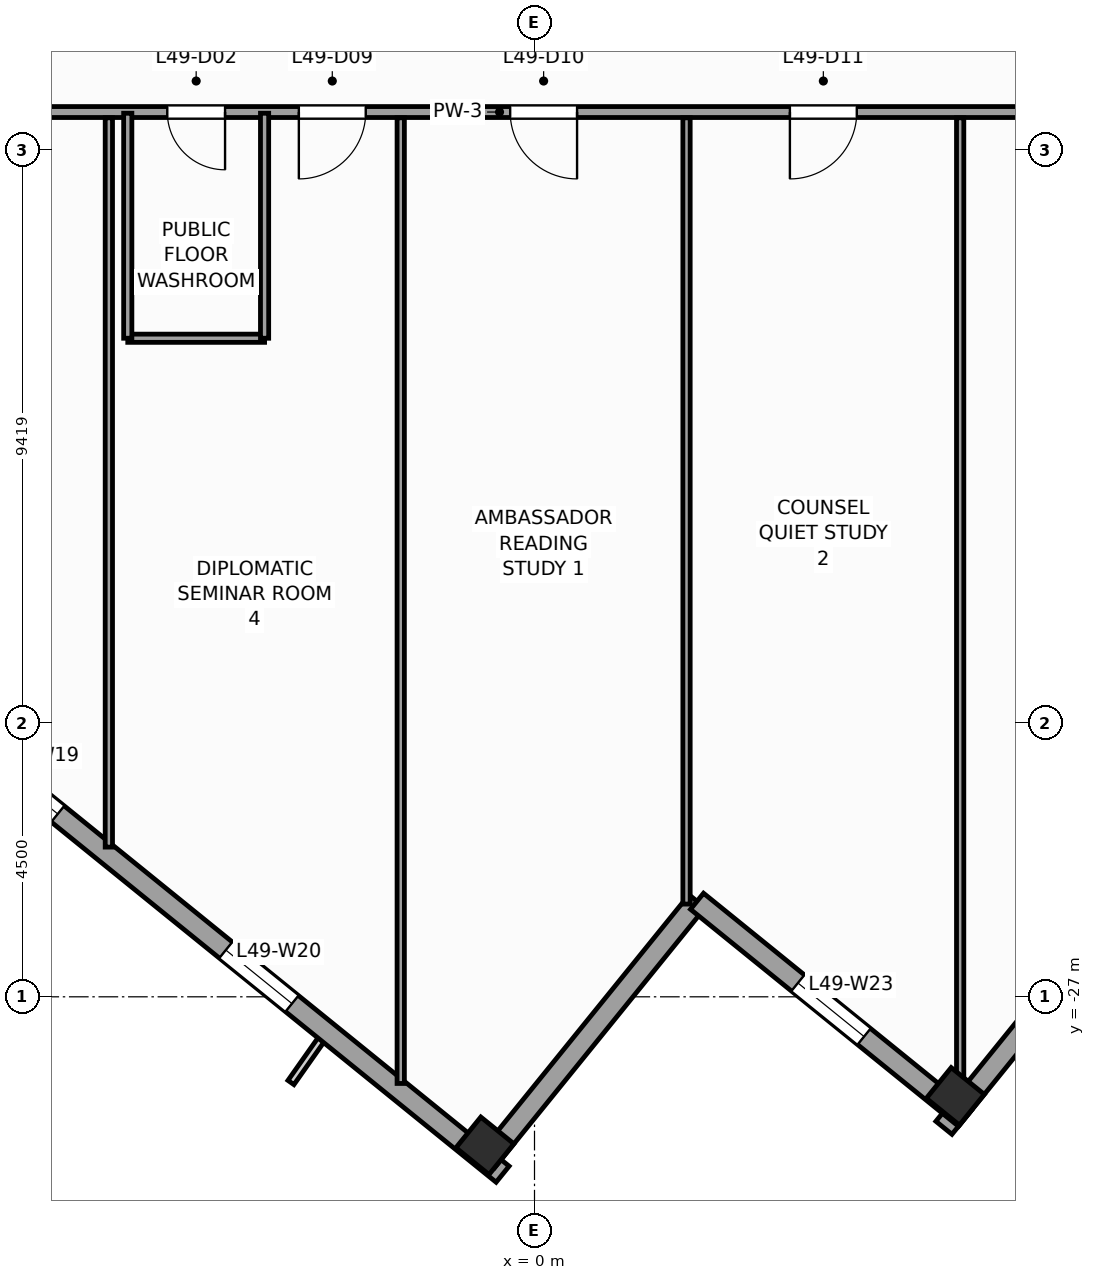
"""IFC4 building model, lengths in metres.
Left out: names, types, materials, properties, quantities, classifications, styles, units other than length and angle.
Written with IfcOpenShell. Run it as: python <this file> out.ifc"""

import sys

from ifc_helpers import new_model, si_unit, direction, frame, frame_2d, origin, origin_2d, place, context, subcontext, project, spatial, rectangle, extrude, source, transform, mapped, element, fill, save


model = new_model("IFC4")
c1 = context("Model", 3, precision=1e-05, world=origin(), true_north=direction((0.0, 1.0)))
c2 = subcontext(c1, "Body", "Model", "MODEL_VIEW")
j1 = project(units=[si_unit("LENGTHUNIT", "METRE"), si_unit("PLANEANGLEUNIT", "RADIAN")], contexts=[c1])
p1 = place(None, origin())
s1 = spatial("IfcSite", under=j1, at=p1, CompositionType="ELEMENT")
p2 = place(p1, origin())
s2 = spatial("IfcBuilding", under=s1, at=p2, CompositionType="ELEMENT")
p3 = place(p2, frame((0.0, 0.0, 205.6)))
s3 = spatial("IfcBuildingStorey", under=s2, at=p3, CompositionType="ELEMENT", Elevation=205.6)
m1 = source(origin(), c2, "Body", "SweptSolid", [
    extrude(rectangle(XDim=0.65, YDim=0.7, at=origin_2d()), origin(), (0.0, 0.0, 1.0), 3.9),
])
for number, where, z_axis, x_axis in (
    (1, (6.92, -28.637, 0.0), (0.0, 0.0, 1.0), (0.629, 0.777, 0.0)),
    (2, (-0.815, -29.45, 0.0), (0.0, 0.0, 1.0), (0.629, 0.777, 0.0)),
):
    element("IfcColumn", number, at=place(p3, frame(where, z_axis=z_axis, x_axis=x_axis)), inside=s3, PredefinedType="COLUMN", context=c2, shape_type="MappedRepresentation", body=[
        mapped(m1, transform((0.0, 0.0, 0.0), scale=1.0)),
    ])
p4 = place(p3, frame((6.733, -29.154, 0.0), z_axis=(0.0, 0.0, 1.0), x_axis=(0.629325378072, 0.77714192302, 0.0)))
e3 = element("IfcWall", 3, at=p4, inside=s3, PredefinedType="STANDARD", context=c2, shape_type="SweptSolid", body=[
    extrude(rectangle(XDim=36.84, YDim=0.34, at=frame_2d((18.42, 0.0))), origin(), (0.0, 0.0, 1.0), 2.96),
])
p5 = place(p4, frame((3.721, 0.0, 0.48)))
e4 = element("IfcOpeningElement", 4, at=p5, cuts=e3, PredefinedType="OPENING", context=c2, shape_type="SweptSolid", body=[
    extrude(rectangle(XDim=1.4, YDim=2.4, at=frame_2d((0.7, 1.2))), frame((0.0, 0.18, 0.0), z_axis=(0.0, -1.0, 0.0), x_axis=(1.0, 0.0, 0.0)), (0.0, 0.0, 1.0), 0.36),
])
p6 = place(p4, frame((10.559, 0.0, 0.58)))
e5 = element("IfcOpeningElement", 5, at=p6, cuts=e3, PredefinedType="OPENING", context=c2, shape_type="SweptSolid", body=[
    extrude(rectangle(XDim=1.75, YDim=2.3, at=frame_2d((0.875, 1.15))), frame((0.0, 0.18, 0.0), z_axis=(0.0, -1.0, 0.0), x_axis=(1.0, 0.0, 0.0)), (0.0, 0.0, 1.0), 0.36),
])
p7 = place(p4, frame((16.058, 0.0, 0.58)))
e6 = element("IfcOpeningElement", 6, at=p7, cuts=e3, PredefinedType="OPENING", context=c2, shape_type="SweptSolid", body=[
    extrude(rectangle(XDim=1.75, YDim=2.3, at=frame_2d((0.875, 1.15))), frame((0.0, 0.18, 0.0), z_axis=(0.0, -1.0, 0.0), x_axis=(1.0, 0.0, 0.0)), (0.0, 0.0, 1.0), 0.36),
])
p8 = place(p4, frame((24.176, 0.0, 0.58)))
e7 = element("IfcOpeningElement", 7, at=p8, cuts=e3, PredefinedType="OPENING", context=c2, shape_type="SweptSolid", body=[
    extrude(rectangle(XDim=1.75, YDim=2.3, at=frame_2d((0.875, 1.15))), frame((0.0, 0.18, 0.0), z_axis=(0.0, -1.0, 0.0), x_axis=(1.0, 0.0, 0.0)), (0.0, 0.0, 1.0), 0.36),
])
p9 = place(p4, frame((30.982, 0.0, 0.48)))
e8 = element("IfcOpeningElement", 8, at=p9, cuts=e3, PredefinedType="OPENING", context=c2, shape_type="SweptSolid", body=[
    extrude(rectangle(XDim=1.4, YDim=2.4, at=frame_2d((0.7, 1.2))), frame((0.0, 0.18, 0.0), z_axis=(0.0, -1.0, 0.0), x_axis=(1.0, 0.0, 0.0)), (0.0, 0.0, 1.0), 0.36),
])
p10 = place(p3, frame((-29.154, -6.733, 0.0), z_axis=(0.0, 0.0, 1.0), x_axis=(0.77714192302, -0.629325378072, 0.0)))
e9 = element("IfcWall", 9, at=p10, inside=s3, PredefinedType="STANDARD", context=c2, shape_type="SweptSolid", body=[
    extrude(rectangle(XDim=36.84, YDim=0.34, at=frame_2d((18.42, 0.0))), origin(), (0.0, 0.0, 1.0), 2.96),
])
p11 = place(p10, frame((23.495, 0.0, 0.0)))
e10 = element("IfcOpeningElement", 10, at=p11, cuts=e9, PredefinedType="OPENING", context=c2, shape_type="SweptSolid", body=[
    extrude(rectangle(XDim=1.05, YDim=2.25, at=frame_2d((0.525, 1.125))), frame((0.0, 0.18, 0.0), z_axis=(0.0, -1.0, 0.0), x_axis=(1.0, 0.0, 0.0)), (0.0, 0.0, 1.0), 0.36),
])
p12 = place(p10, frame((3.721, 0.0, 0.48)))
e11 = element("IfcOpeningElement", 11, at=p12, cuts=e9, PredefinedType="OPENING", context=c2, shape_type="SweptSolid", body=[
    extrude(rectangle(XDim=1.4, YDim=2.4, at=frame_2d((0.7, 1.2))), frame((0.0, 0.18, 0.0), z_axis=(0.0, -1.0, 0.0), x_axis=(1.0, 0.0, 0.0)), (0.0, 0.0, 1.0), 0.36),
])
p13 = place(p10, frame((9.809, 0.0, 0.58)))
e12 = element("IfcOpeningElement", 12, at=p13, cuts=e9, PredefinedType="OPENING", context=c2, shape_type="SweptSolid", body=[
    extrude(rectangle(XDim=1.75, YDim=2.3, at=frame_2d((0.875, 1.15))), frame((0.0, 0.18, 0.0), z_axis=(0.0, -1.0, 0.0), x_axis=(1.0, 0.0, 0.0)), (0.0, 0.0, 1.0), 0.36),
])
p14 = place(p10, frame((16.058, 0.0, 0.58)))
e13 = element("IfcOpeningElement", 13, at=p14, cuts=e9, PredefinedType="OPENING", context=c2, shape_type="SweptSolid", body=[
    extrude(rectangle(XDim=1.75, YDim=2.3, at=frame_2d((0.875, 1.15))), frame((0.0, 0.18, 0.0), z_axis=(0.0, -1.0, 0.0), x_axis=(1.0, 0.0, 0.0)), (0.0, 0.0, 1.0), 0.36),
])
p15 = place(p10, frame((25.676, 0.0, 0.58)))
e14 = element("IfcOpeningElement", 14, at=p15, cuts=e9, PredefinedType="OPENING", context=c2, shape_type="SweptSolid", body=[
    extrude(rectangle(XDim=1.75, YDim=2.3, at=frame_2d((0.875, 1.15))), frame((0.0, 0.18, 0.0), z_axis=(0.0, -1.0, 0.0), x_axis=(1.0, 0.0, 0.0)), (0.0, 0.0, 1.0), 0.36),
])
p16 = place(p10, frame((30.982, 0.0, 0.48)))
e15 = element("IfcOpeningElement", 15, at=p16, cuts=e9, PredefinedType="OPENING", context=c2, shape_type="SweptSolid", body=[
    extrude(rectangle(XDim=1.4, YDim=2.4, at=frame_2d((0.7, 1.2))), frame((0.0, 0.18, 0.0), z_axis=(0.0, -1.0, 0.0), x_axis=(1.0, 0.0, 0.0)), (0.0, 0.0, 1.0), 0.36),
])
p17 = place(p3, frame((-0.789, -29.703, 0.0), z_axis=(0.0, 0.0, 1.0), x_axis=(0.629323365087, 0.77714355312, 0.0)))
e16 = element("IfcWall", 16, at=p17, inside=s3, PredefinedType="STANDARD", context=c2, shape_type="SweptSolid", body=[
    extrude(rectangle(XDim=5.5, YDim=0.34, at=frame_2d((2.75, 0.0))), origin(), (0.0, 0.0, 1.0), 3.66),
])
p18 = place(p3, frame((2.673, -25.429, 0.0), z_axis=(0.0, 0.0, 1.0), x_axis=(0.777162640055, -0.629299794138, 0.0)))
e17 = element("IfcWall", 17, at=p18, inside=s3, PredefinedType="STANDARD", context=c2, shape_type="SweptSolid", body=[
    extrude(rectangle(XDim=5.67, YDim=0.34, at=frame_2d((2.835, 0.0))), origin(), (0.0, 0.0, 1.0), 3.66),
])
p19 = place(p18, frame((2.135, 0.0, 0.48)))
e18 = element("IfcOpeningElement", 18, at=p19, cuts=e17, PredefinedType="OPENING", context=c2, shape_type="SweptSolid", body=[
    extrude(rectangle(XDim=1.4, YDim=2.4, at=frame_2d((0.7, 1.2))), frame((0.0, 0.18, 0.0), z_axis=(0.0, -1.0, 0.0), x_axis=(1.0, 0.0, 0.0)), (0.0, 0.0, 1.0), 0.36),
])
p20 = place(p3, frame((-11.45, -12.45, 0.0), z_axis=(0.0, 0.0, 1.0), x_axis=(1.0, 0.0, 0.0)))
e19 = element("IfcWall", 19, at=p20, inside=s3, PredefinedType="PARTITIONING", context=c2, shape_type="SweptSolid", body=[
    extrude(rectangle(XDim=21.75, YDim=0.18, at=frame_2d((10.875, 0.0))), origin(), (0.0, 0.0, 1.0), 3.66),
])
p21 = place(p20, frame((5.411, 0.0, 0.0)))
e20 = element("IfcOpeningElement", 20, at=p21, cuts=e19, PredefinedType="OPENING", context=c2, shape_type="SweptSolid", body=[
    extrude(rectangle(XDim=0.95, YDim=2.1, at=frame_2d((0.475, 1.05))), frame((0.0, 0.1, 0.0), z_axis=(0.0, -1.0, 0.0), x_axis=(1.0, 0.0, 0.0)), (0.0, 0.0, 1.0), 0.2),
])
p22 = place(p20, frame((1.839, 0.0, 0.0)))
e21 = element("IfcOpeningElement", 21, at=p22, cuts=e19, PredefinedType="OPENING", context=c2, shape_type="SweptSolid", body=[
    extrude(rectangle(XDim=1.1, YDim=2.2, at=frame_2d((0.55, 1.1))), frame((0.0, 0.1, 0.0), z_axis=(0.0, -1.0, 0.0), x_axis=(1.0, 0.0, 0.0)), (0.0, 0.0, 1.0), 0.2),
])
p23 = place(p20, frame((7.574, 0.0, 0.0)))
e22 = element("IfcOpeningElement", 22, at=p23, cuts=e19, PredefinedType="OPENING", context=c2, shape_type="SweptSolid", body=[
    extrude(rectangle(XDim=1.1, YDim=2.2, at=frame_2d((0.55, 1.1))), frame((0.0, 0.1, 0.0), z_axis=(0.0, -1.0, 0.0), x_axis=(1.0, 0.0, 0.0)), (0.0, 0.0, 1.0), 0.2),
])
p24 = place(p20, frame((11.05, 0.0, 0.0)))
e23 = element("IfcOpeningElement", 23, at=p24, cuts=e19, PredefinedType="OPENING", context=c2, shape_type="SweptSolid", body=[
    extrude(rectangle(XDim=1.1, YDim=2.2, at=frame_2d((0.55, 1.1))), frame((0.0, 0.1, 0.0), z_axis=(0.0, -1.0, 0.0), x_axis=(1.0, 0.0, 0.0)), (0.0, 0.0, 1.0), 0.2),
])
p25 = place(p20, frame((15.65, 0.0, 0.0)))
e24 = element("IfcOpeningElement", 24, at=p25, cuts=e19, PredefinedType="OPENING", context=c2, shape_type="SweptSolid", body=[
    extrude(rectangle(XDim=1.1, YDim=2.2, at=frame_2d((0.55, 1.1))), frame((0.0, 0.1, 0.0), z_axis=(0.0, -1.0, 0.0), x_axis=(1.0, 0.0, 0.0)), (0.0, 0.0, 1.0), 0.2),
])
p26 = place(p3, frame((-7.0, -24.538, 0.0), z_axis=(0.0, 0.0, 1.0), x_axis=(0.0, 1.0, 0.0)))
e25 = element("IfcWall", 25, at=p26, inside=s3, PredefinedType="PARTITIONING", context=c2, shape_type="SweptSolid", body=[
    extrude(rectangle(XDim=11.993, YDim=0.12, at=frame_2d((5.997, 0.0))), origin(), (0.0, 0.0, 1.0), 3.66),
])
p27 = place(p3, frame((-2.2, -28.425, 0.0), z_axis=(0.0, 0.0, 1.0), x_axis=(0.0, 1.0, 0.0)))
e26 = element("IfcWall", 26, at=p27, inside=s3, PredefinedType="PARTITIONING", context=c2, shape_type="SweptSolid", body=[
    extrude(rectangle(XDim=15.88, YDim=0.12, at=frame_2d((7.94, 0.0))), origin(), (0.0, 0.0, 1.0), 3.66),
])
p28 = place(p3, frame((2.5, -25.475, 0.0), z_axis=(0.0, 0.0, 1.0), x_axis=(0.0, 1.0, 0.0)))
e27 = element("IfcWall", 27, at=p28, inside=s3, PredefinedType="PARTITIONING", context=c2, shape_type="SweptSolid", body=[
    extrude(rectangle(XDim=12.93, YDim=0.12, at=frame_2d((6.465, 0.0))), origin(), (0.0, 0.0, 1.0), 3.66),
])
p29 = place(p3, frame((7.0, -28.658, 0.0), z_axis=(0.0, 0.0, 1.0), x_axis=(0.0, 1.0, 0.0)))
e28 = element("IfcWall", 28, at=p29, inside=s3, PredefinedType="PARTITIONING", context=c2, shape_type="SweptSolid", body=[
    extrude(rectangle(XDim=16.113, YDim=0.12, at=frame_2d((8.057, 0.0))), origin(), (0.0, 0.0, 1.0), 2.96),
])
p30 = place(p3, frame((-6.689, -16.17, 0.0), z_axis=(0.0, 0.0, 1.0), x_axis=(1.0, 0.0, 0.0)))
e29 = element("IfcWall", 29, at=p30, inside=s3, PredefinedType="PARTITIONING", context=c2, shape_type="SweptSolid", body=[
    extrude(rectangle(XDim=2.25, YDim=0.135, at=frame_2d((1.125, 0.0))), origin(), (0.0, 0.0, 1.0), 3.66),
])
for number, where, z_axis, x_axis in (
    (30, (-4.439, -16.17, 0.0), (0.0, 0.0, 1.0), (0.0, 1.0, 0.0)),
    (31, (-6.689, -16.17, 0.0), (0.0, 0.0, 1.0), (0.0, 1.0, 0.0)),
):
    element("IfcWall", number, at=place(p3, frame(where, z_axis=z_axis, x_axis=x_axis)), inside=s3, PredefinedType="PARTITIONING", context=c2, shape_type="SweptSolid", body=[
        extrude(rectangle(XDim=3.7, YDim=0.135, at=frame_2d((1.85, 0.0))), origin(), (0.0, 0.0, 1.0), 3.66),
    ])
m2 = source(origin(), c2, "Body", "SweptSolid", [
    extrude(rectangle(XDim=1.75, YDim=2.3, at=frame_2d((0.875, 1.15))), frame((0.0, 0.03, 0.0), z_axis=(0.0, -1.0, 0.0), x_axis=(1.0, 0.0, 0.0)), (0.0, 0.0, 1.0), 0.06),
])
p31 = place(p15, origin())
e32 = element("IfcWindow", 32, at=p31, inside=s3, PartitioningType="SINGLE_PANEL", PredefinedType="WINDOW", context=c2, shape_type="MappedRepresentation", body=[
    mapped(m2, transform((0.0, 0.0, 0.0), scale=1.0)),
])
fill(e14, e32)
m3 = source(origin(), c2, "Body", "SweptSolid", [
    extrude(rectangle(XDim=1.4, YDim=2.4, at=frame_2d((0.7, 1.2))), frame((0.0, 0.03, 0.0), z_axis=(0.0, -1.0, 0.0), x_axis=(1.0, 0.0, 0.0)), (0.0, 0.0, 1.0), 0.06),
])
p32 = place(p16, origin())
e33 = element("IfcWindow", 33, at=p32, inside=s3, PartitioningType="SINGLE_PANEL", PredefinedType="WINDOW", context=c2, shape_type="MappedRepresentation", body=[
    mapped(m3, transform((0.0, 0.0, 0.0), scale=1.0)),
])
fill(e15, e33)
p33 = place(p19, origin())
e34 = element("IfcWindow", 34, at=p33, inside=s3, PartitioningType="SINGLE_PANEL", PredefinedType="WINDOW", context=c2, shape_type="MappedRepresentation", body=[
    mapped(m3, transform((0.0, 0.0, 0.0), scale=1.0)),
])
fill(e18, e34)
m4 = source(origin(), c2, "Body", "SweptSolid", [
    extrude(rectangle(XDim=0.95, YDim=2.1, at=frame_2d((0.475, 1.05))), frame((0.0, 0.025, 0.0), z_axis=(0.0, -1.0, 0.0), x_axis=(1.0, 0.0, 0.0)), (0.0, 0.0, 1.0), 0.05),
])
p34 = place(p21, frame((0.95, 0.0, 0.0), z_axis=(0.0, 0.0, 1.0), x_axis=(-1.0, 0.0, 0.0)))
e35 = element("IfcDoor", 35, at=p34, inside=s3, OperationType="SINGLE_SWING_RIGHT", PredefinedType="DOOR", context=c2, shape_type="MappedRepresentation", body=[
    mapped(m4, transform((0.0, 0.0, 0.0), scale=1.0)),
])
fill(e20, e35)
m5 = source(origin(), c2, "Body", "SweptSolid", [
    extrude(rectangle(XDim=1.1, YDim=2.2, at=frame_2d((0.55, 1.1))), frame((0.0, 0.025, 0.0), z_axis=(0.0, -1.0, 0.0), x_axis=(1.0, 0.0, 0.0)), (0.0, 0.0, 1.0), 0.05),
])
p35 = place(p23, frame((1.1, 0.0, 0.0), z_axis=(0.0, 0.0, 1.0), x_axis=(-1.0, 0.0, 0.0)))
e36 = element("IfcDoor", 36, at=p35, inside=s3, OperationType="SINGLE_SWING_LEFT", PredefinedType="DOOR", context=c2, shape_type="MappedRepresentation", body=[
    mapped(m5, transform((0.0, 0.0, 0.0), scale=1.0)),
])
fill(e22, e36)
p36 = place(p24, frame((1.1, 0.0, 0.0), z_axis=(0.0, 0.0, 1.0), x_axis=(-1.0, 0.0, 0.0)))
e37 = element("IfcDoor", 37, at=p36, inside=s3, OperationType="SINGLE_SWING_RIGHT", PredefinedType="DOOR", context=c2, shape_type="MappedRepresentation", body=[
    mapped(m5, transform((0.0, 0.0, 0.0), scale=1.0)),
])
fill(e23, e37)
p37 = place(p25, frame((1.1, 0.0, 0.0), z_axis=(0.0, 0.0, 1.0), x_axis=(-1.0, 0.0, 0.0)))
e38 = element("IfcDoor", 38, at=p37, inside=s3, OperationType="SINGLE_SWING_LEFT", PredefinedType="DOOR", context=c2, shape_type="MappedRepresentation", body=[
    mapped(m5, transform((0.0, 0.0, 0.0), scale=1.0)),
])
fill(e24, e38)
save(model, sys.argv[1])
